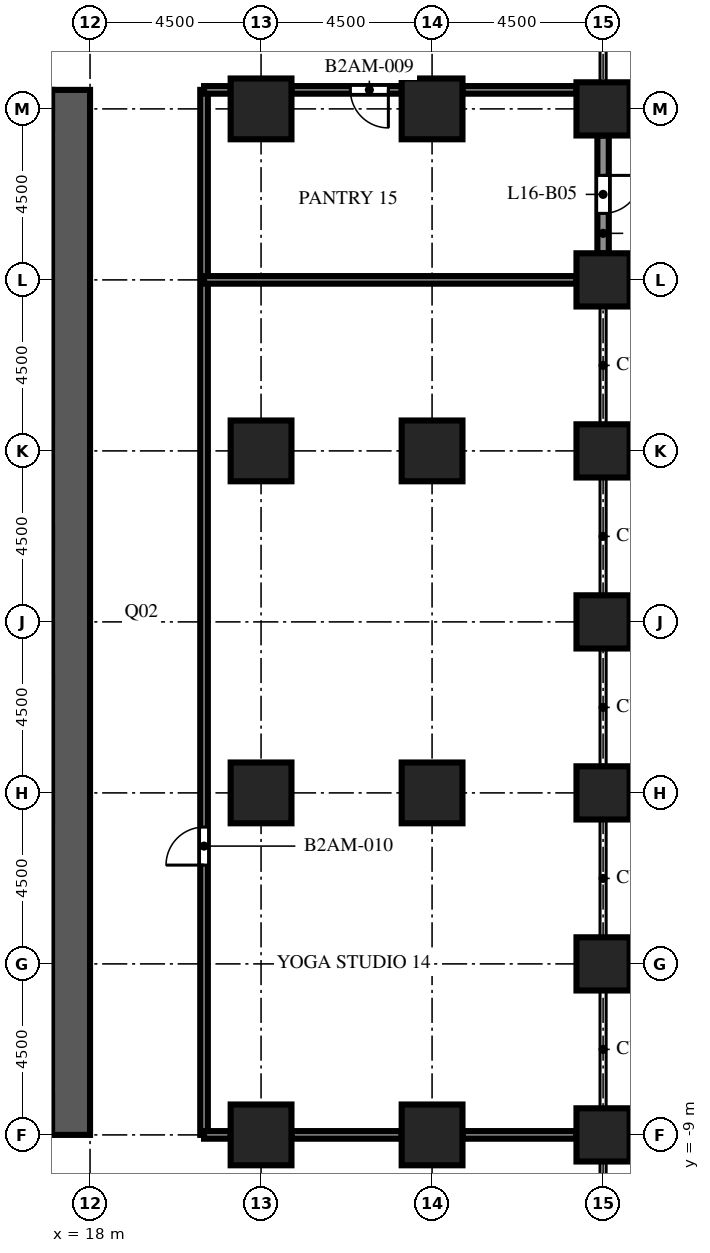
"""IFC4 building model, lengths in metres.
Left out: names, types, materials, properties, quantities, classifications, styles, units other than length and angle.
Written with IfcOpenShell. Run it as: python <this file> out.ifc"""

import sys

from ifc_helpers import new_model, si_unit, direction, frame, frame_2d, origin, origin_2d, place, context, subcontext, project, spatial, rectangle, extrude, element, fill, save


model = new_model("IFC4")
c1 = context("Model", 3, precision=1e-05, world=origin(), true_north=direction((0.0, 1.0)))
c2 = subcontext(c1, "Body", "Model", "MODEL_VIEW")
j1 = project(units=[si_unit("LENGTHUNIT", "METRE"), si_unit("PLANEANGLEUNIT", "RADIAN")], contexts=[c1])
p1 = place(None, origin())
s1 = spatial("IfcSite", under=j1, at=p1, CompositionType="ELEMENT")
p2 = place(p1, origin())
s2 = spatial("IfcBuilding", under=s1, at=p2, CompositionType="ELEMENT")
p3 = place(p2, frame((0.0, 0.0, 70.6)))
s3 = spatial("IfcBuildingStorey", under=s2, at=p3, CompositionType="ELEMENT", Elevation=70.6)
for number, where, z_axis, x_axis in (
    (1, (31.5, -9.0, 0.0), (0.0, 0.0, 1.0), (1.0, 0.0, 0.0)),
    (2, (31.5, -4.5, 0.0), (0.0, 0.0, 1.0), (1.0, 0.0, 0.0)),
    (3, (31.5, 0.0, 0.0), (0.0, 0.0, 1.0), (1.0, 0.0, 0.0)),
    (4, (31.5, 4.5, 0.0), (0.0, 0.0, 1.0), (1.0, 0.0, 0.0)),
    (5, (31.5, 9.0, 0.0), (0.0, 0.0, 1.0), (1.0, 0.0, 0.0)),
    (6, (31.5, 13.5, 0.0), (0.0, 0.0, 1.0), (1.0, 0.0, 0.0)),
    (7, (31.5, 18.0, 0.0), (0.0, 0.0, 1.0), (1.0, 0.0, 0.0)),
):
    element("IfcColumn", number, at=place(p3, frame(where, z_axis=z_axis, x_axis=x_axis)), inside=s3, PredefinedType="COLUMN", context=c2, shape_type="SweptSolid", body=[
        extrude(rectangle(XDim=1.4, YDim=1.4, at=origin_2d()), origin(), (0.0, 0.0, 1.0), 6.0),
    ])
for number, where, z_axis, x_axis in (
    (8, (22.5, -9.0, 0.0), (0.0, 0.0, 1.0), (1.0, 0.0, 0.0)),
    (9, (22.5, 0.0, 0.0), (0.0, 0.0, 1.0), (1.0, 0.0, 0.0)),
    (10, (22.5, 9.0, 0.0), (0.0, 0.0, 1.0), (1.0, 0.0, 0.0)),
    (11, (22.5, 18.0, 0.0), (0.0, 0.0, 1.0), (1.0, 0.0, 0.0)),
    (12, (27.0, -9.0, 0.0), (0.0, 0.0, 1.0), (1.0, 0.0, 0.0)),
    (13, (27.0, 0.0, 0.0), (0.0, 0.0, 1.0), (1.0, 0.0, 0.0)),
    (14, (27.0, 9.0, 0.0), (0.0, 0.0, 1.0), (1.0, 0.0, 0.0)),
    (15, (27.0, 18.0, 0.0), (0.0, 0.0, 1.0), (1.0, 0.0, 0.0)),
):
    element("IfcColumn", number, at=place(p3, frame(where, z_axis=z_axis, x_axis=x_axis)), inside=s3, PredefinedType="COLUMN", context=c2, shape_type="SweptSolid", body=[
        extrude(rectangle(XDim=1.6, YDim=1.6, at=origin_2d()), origin(), (0.0, 0.0, 1.0), 6.0),
    ])
p4 = place(p3, frame((17.5, -9.0, 0.0), z_axis=(0.0, 0.0, 1.0), x_axis=(0.0, 1.0, 0.0)))
e16 = element("IfcWall", 16, at=p4, inside=s3, PredefinedType="SHEAR", context=c2, shape_type="SweptSolid", body=[
    extrude(rectangle(XDim=27.5, YDim=1.0, at=frame_2d((13.75, 0.0))), origin(), (0.0, 0.0, 1.0), 6.0),
])
p5 = place(p4, frame((12.55, 0.0, 0.0)))
e17 = element("IfcOpeningElement", 17, at=p5, cuts=e16, PredefinedType="OPENING", context=c2, shape_type="SweptSolid", body=[
    extrude(rectangle(XDim=2.4, YDim=2.4, at=frame_2d((1.2, 1.2))), frame((0.0, 0.51, 0.0), z_axis=(0.0, -1.0, 0.0), x_axis=(1.0, 0.0, 0.0)), (0.0, 0.0, 1.0), 1.02),
])
p6 = place(p4, frame((6.825, 0.0, 0.0)))
e18 = element("IfcOpeningElement", 18, at=p6, cuts=e16, PredefinedType="OPENING", context=c2, shape_type="SweptSolid", body=[
    extrude(rectangle(XDim=1.2, YDim=2.1, at=frame_2d((0.6, 1.05))), frame((0.0, 0.51, 0.0), z_axis=(0.0, -1.0, 0.0), x_axis=(1.0, 0.0, 0.0)), (0.0, 0.0, 1.0), 1.02),
])
p7 = place(p4, frame((19.475, 0.0, 0.0)))
e19 = element("IfcOpeningElement", 19, at=p7, cuts=e16, PredefinedType="OPENING", context=c2, shape_type="SweptSolid", body=[
    extrude(rectangle(XDim=1.2, YDim=2.1, at=frame_2d((0.6, 1.05))), frame((0.0, 0.51, 0.0), z_axis=(0.0, -1.0, 0.0), x_axis=(1.0, 0.0, 0.0)), (0.0, 0.0, 1.0), 1.02),
])
p8 = place(p3, frame((31.5, 17.3, 0.0), z_axis=(0.0, 0.0, 1.0), x_axis=(0.0, -1.0, 0.0)))
e20 = element("IfcWall", 20, at=p8, inside=s3, PredefinedType="SOLIDWALL", context=c2, shape_type="SweptSolid", body=[
    extrude(rectangle(XDim=3.1, YDim=0.3, at=frame_2d((1.55, 0.0))), origin(), (0.0, 0.0, 1.0), 4.5),
])
p9 = place(p8, frame((1.05, 0.0, 0.0)))
e21 = element("IfcOpeningElement", 21, at=p9, cuts=e20, PredefinedType="OPENING", context=c2, shape_type="SweptSolid", body=[
    extrude(rectangle(XDim=1.0, YDim=2.2, at=frame_2d((0.5, 1.1))), frame((0.0, 0.16, 0.0), z_axis=(0.0, -1.0, 0.0), x_axis=(1.0, 0.0, 0.0)), (0.0, 0.0, 1.0), 0.32),
])
p10 = place(p3, frame((21.0, 18.5, 0.0), z_axis=(0.0, 0.0, 1.0), x_axis=(0.0, -1.0, 0.0)))
e22 = element("IfcWall", 22, at=p10, inside=s3, PredefinedType="PARTITIONING", context=c2, shape_type="SweptSolid", body=[
    extrude(rectangle(XDim=27.5, YDim=0.2, at=frame_2d((13.75, 0.0))), origin(), (0.0, 0.0, 1.0), 5.4),
])
p11 = place(p10, frame((19.4, 0.0, 0.0)))
e23 = element("IfcOpeningElement", 23, at=p11, cuts=e22, PredefinedType="OPENING", context=c2, shape_type="SweptSolid", body=[
    extrude(rectangle(XDim=1.0, YDim=2.1, at=frame_2d((0.5, 1.05))), frame((0.0, 0.11, 0.0), z_axis=(0.0, -1.0, 0.0), x_axis=(1.0, 0.0, 0.0)), (0.0, 0.0, 1.0), 0.22),
])
p12 = place(p3, frame((21.0, -9.0, 0.0), z_axis=(0.0, 0.0, 1.0), x_axis=(1.0, 0.0, 0.0)))
e24 = element("IfcWall", 24, at=p12, inside=s3, PredefinedType="PARTITIONING", context=c2, shape_type="SweptSolid", body=[
    extrude(rectangle(XDim=0.7, YDim=0.2, at=frame_2d((0.35, 0.0))), origin(), (0.0, 0.0, 1.0), 5.4),
])
p13 = place(p3, frame((23.3, -9.0, 0.0), z_axis=(0.0, 0.0, 1.0), x_axis=(1.0, 0.0, 0.0)))
e25 = element("IfcWall", 25, at=p13, inside=s3, PredefinedType="PARTITIONING", context=c2, shape_type="SweptSolid", body=[
    extrude(rectangle(XDim=2.9, YDim=0.2, at=frame_2d((1.45, 0.0))), origin(), (0.0, 0.0, 1.0), 5.4),
])
p14 = place(p3, frame((27.8, -9.0, 0.0), z_axis=(0.0, 0.0, 1.0), x_axis=(1.0, 0.0, 0.0)))
e26 = element("IfcWall", 26, at=p14, inside=s3, PredefinedType="PARTITIONING", context=c2, shape_type="SweptSolid", body=[
    extrude(rectangle(XDim=3.0, YDim=0.2, at=frame_2d((1.5, 0.0))), origin(), (0.0, 0.0, 1.0), 5.4),
])
p15 = place(p3, frame((21.0, 13.5, 0.0), z_axis=(0.0, 0.0, 1.0), x_axis=(1.0, 0.0, 0.0)))
e27 = element("IfcWall", 27, at=p15, inside=s3, PredefinedType="PARTITIONING", context=c2, shape_type="SweptSolid", body=[
    extrude(rectangle(XDim=9.8, YDim=0.2, at=frame_2d((4.9, 0.0))), origin(), (0.0, 0.0, 1.0), 5.4),
])
p16 = place(p3, frame((21.0, 18.5, 0.0), z_axis=(0.0, 0.0, 1.0), x_axis=(1.0, 0.0, 0.0)))
e28 = element("IfcWall", 28, at=p16, inside=s3, PredefinedType="PARTITIONING", context=c2, shape_type="SweptSolid", body=[
    extrude(rectangle(XDim=0.7, YDim=0.2, at=frame_2d((0.35, 0.0))), origin(), (0.0, 0.0, 1.0), 5.4),
])
p17 = place(p3, frame((26.2, 18.5, 0.0), z_axis=(0.0, 0.0, 1.0), x_axis=(-1.0, 0.0, 0.0)))
e29 = element("IfcWall", 29, at=p17, inside=s3, PredefinedType="PARTITIONING", context=c2, shape_type="SweptSolid", body=[
    extrude(rectangle(XDim=2.9, YDim=0.2, at=frame_2d((1.45, 0.0))), origin(), (0.0, 0.0, 1.0), 5.4),
])
p18 = place(p17, frame((0.35, 0.0, 0.0)))
e30 = element("IfcOpeningElement", 30, at=p18, cuts=e29, PredefinedType="OPENING", context=c2, shape_type="SweptSolid", body=[
    extrude(rectangle(XDim=1.0, YDim=2.1, at=frame_2d((0.5, 1.05))), frame((0.0, 0.11, 0.0), z_axis=(0.0, -1.0, 0.0), x_axis=(1.0, 0.0, 0.0)), (0.0, 0.0, 1.0), 0.22),
])
p19 = place(p3, frame((27.8, 18.5, 0.0), z_axis=(0.0, 0.0, 1.0), x_axis=(1.0, 0.0, 0.0)))
e31 = element("IfcWall", 31, at=p19, inside=s3, PredefinedType="PARTITIONING", context=c2, shape_type="SweptSolid", body=[
    extrude(rectangle(XDim=3.0, YDim=0.2, at=frame_2d((1.5, 0.0))), origin(), (0.0, 0.0, 1.0), 5.4),
])
p20 = place(p9, origin())
e32 = element("IfcDoor", 32, at=p20, inside=s3, OperationType="SINGLE_SWING_LEFT", PredefinedType="DOOR", context=c2, shape_type="SweptSolid", body=[
    extrude(rectangle(XDim=1.0, YDim=2.2, at=frame_2d((0.5, 1.1))), frame((0.0, 0.025, 0.0), z_axis=(0.0, -1.0, 0.0), x_axis=(1.0, 0.0, 0.0)), (0.0, 0.0, 1.0), 0.05),
])
fill(e21, e32)
p21 = place(p5, origin())
e33 = element("IfcDoor", 33, at=p21, inside=s3, OperationType="DOUBLE_DOOR_DOUBLE_SWING", PredefinedType="DOOR", context=c2, shape_type="SweptSolid", body=[
    extrude(rectangle(XDim=2.4, YDim=2.4, at=frame_2d((1.2, 1.2))), frame((0.0, 0.025, 0.0), z_axis=(0.0, -1.0, 0.0), x_axis=(1.0, 0.0, 0.0)), (0.0, 0.0, 1.0), 0.05),
])
fill(e17, e33)
p22 = place(p6, frame((1.2, 0.0, 0.0), z_axis=(0.0, 0.0, 1.0), x_axis=(-1.0, 0.0, 0.0)))
e34 = element("IfcDoor", 34, at=p22, inside=s3, OperationType="SINGLE_SWING_LEFT", PredefinedType="DOOR", context=c2, shape_type="SweptSolid", body=[
    extrude(rectangle(XDim=1.2, YDim=2.1, at=frame_2d((0.6, 1.05))), frame((0.0, 0.025, 0.0), z_axis=(0.0, -1.0, 0.0), x_axis=(1.0, 0.0, 0.0)), (0.0, 0.0, 1.0), 0.05),
])
fill(e18, e34)
p23 = place(p7, frame((1.2, 0.0, 0.0), z_axis=(0.0, 0.0, 1.0), x_axis=(-1.0, 0.0, 0.0)))
e35 = element("IfcDoor", 35, at=p23, inside=s3, OperationType="SINGLE_SWING_LEFT", PredefinedType="DOOR", context=c2, shape_type="SweptSolid", body=[
    extrude(rectangle(XDim=1.2, YDim=2.1, at=frame_2d((0.6, 1.05))), frame((0.0, 0.025, 0.0), z_axis=(0.0, -1.0, 0.0), x_axis=(1.0, 0.0, 0.0)), (0.0, 0.0, 1.0), 0.05),
])
fill(e19, e35)
p24 = place(p18, origin())
e36 = element("IfcDoor", 36, at=p24, inside=s3, OperationType="SINGLE_SWING_LEFT", PredefinedType="DOOR", context=c2, shape_type="SweptSolid", body=[
    extrude(rectangle(XDim=1.0, YDim=2.1, at=frame_2d((0.5, 1.05))), frame((0.0, 0.025, 0.0), z_axis=(0.0, -1.0, 0.0), x_axis=(1.0, 0.0, 0.0)), (0.0, 0.0, 1.0), 0.05),
])
fill(e30, e36)
p25 = place(p11, origin())
e37 = element("IfcDoor", 37, at=p25, inside=s3, OperationType="SINGLE_SWING_RIGHT", PredefinedType="DOOR", context=c2, shape_type="SweptSolid", body=[
    extrude(rectangle(XDim=1.0, YDim=2.1, at=frame_2d((0.5, 1.05))), frame((0.0, 0.025, 0.0), z_axis=(0.0, -1.0, 0.0), x_axis=(1.0, 0.0, 0.0)), (0.0, 0.0, 1.0), 0.05),
])
fill(e23, e37)
save(model, sys.argv[1])
